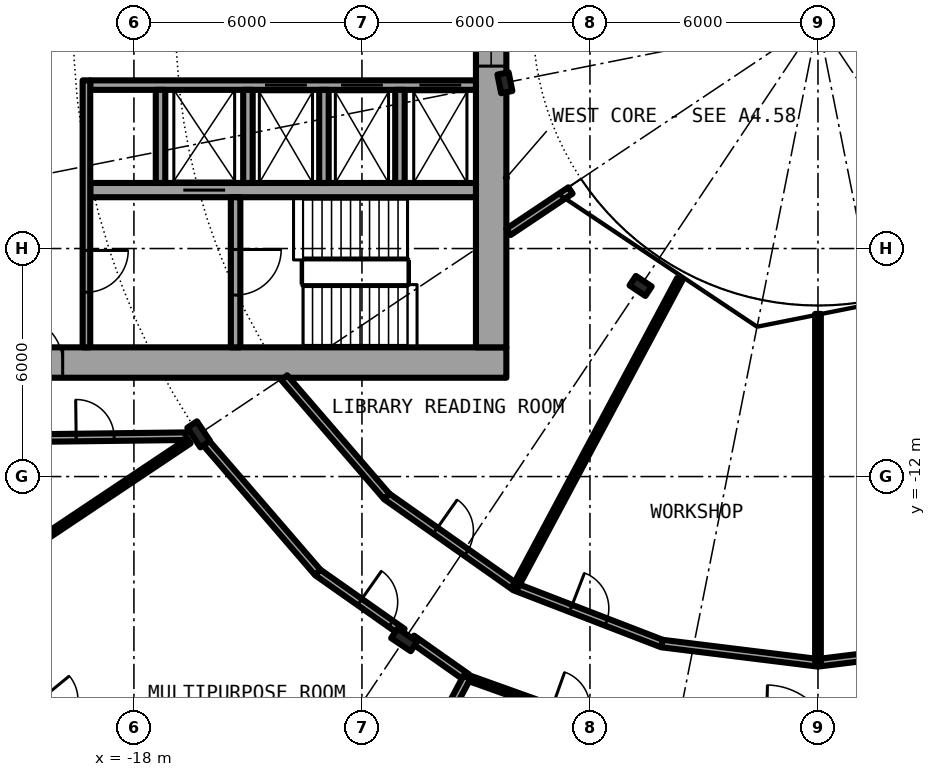
"""IFC4 building model, lengths in metres.
Left out: names, types, materials, properties, quantities, classifications, styles, units other than length and angle.
Written with IfcOpenShell. Run it as: python <this file> out.ifc"""

import sys

from ifc_helpers import new_model, si_unit, direction, frame, frame_2d, origin, origin_2d, place, context, subcontext, project, spatial, rectangle, i_section, extrude, element, fill, save


model = new_model("IFC4")
c1 = context("Model", 3, precision=1e-05, world=origin(), true_north=direction((0.0, 1.0)))
c2 = subcontext(c1, "Body", "Model", "MODEL_VIEW")
j1 = project(units=[si_unit("LENGTHUNIT", "METRE"), si_unit("PLANEANGLEUNIT", "RADIAN")], contexts=[c1])
p1 = place(None, origin())
s1 = spatial("IfcSite", under=j1, at=p1, CompositionType="ELEMENT")
p2 = place(p1, origin())
s2 = spatial("IfcBuilding", under=s1, at=p2, CompositionType="ELEMENT")
p3 = place(p2, frame((0.0, 0.0, 53.3)))
s3 = spatial("IfcBuildingStorey", under=s2, at=p3, CompositionType="ELEMENT", Elevation=53.3)
for number, where, z_axis, x_axis in (
    (1, (-16.297, -10.889, 0.0), (0.0, 0.0, 1.0), (-0.831, -0.556, 0.0)),
    (2, (-10.889, -16.297, 0.0), (0.0, 0.0, 1.0), (-0.556, -0.831, 0.0)),
):
    element("IfcColumn", number, at=place(p3, frame(where, z_axis=z_axis, x_axis=x_axis)), inside=s3, PredefinedType="COLUMN", context=c2, shape_type="SweptSolid", body=[
        extrude(i_section(OverallWidth=0.305, OverallDepth=0.62, WebThickness=0.021, FlangeThickness=0.04, FilletRadius=0.027, at=origin_2d()), origin(), (0.0, 0.0, 1.0), 4.2),
    ])
for number, where, z_axis, x_axis in (
    (3, (-8.239, -1.639, 0.0), (0.0, 0.0, 1.0), (-0.981, -0.195, 0.0)),
    (4, (-4.667, -6.984, 0.0), (0.0, 0.0, 1.0), (-0.556, -0.831, 0.0)),
):
    element("IfcColumn", number, at=place(p3, frame(where, z_axis=z_axis, x_axis=x_axis)), inside=s3, PredefinedType="COLUMN", context=c2, shape_type="SweptSolid", body=[
        extrude(i_section(OverallWidth=0.3, OverallDepth=0.5, WebThickness=0.014, FlangeThickness=0.028, FilletRadius=0.027, at=origin_2d()), origin(), (0.0, 0.0, 1.0), 4.2),
    ])
p4 = place(p3, frame((-22.699, -15.167, 0.0), z_axis=(0.0, 0.0, 1.0), x_axis=(0.634382322723, -0.773019449054, 0.0)))
e5 = element("IfcWall", 5, at=p4, inside=s3, PredefinedType="SOLIDWALL", context=c2, shape_type="SweptSolid", body=[
    extrude(rectangle(XDim=5.352, YDim=0.25, at=frame_2d((2.676, 0.0))), origin(), (0.0, 0.0, 1.0), 3.8),
])
p5 = place(p4, frame((0.841, 0.0, 0.0)))
e6 = element("IfcOpeningElement", 6, at=p5, cuts=e5, PredefinedType="OPENING", context=c2, shape_type="SweptSolid", body=[
    extrude(rectangle(XDim=1.0, YDim=2.2, at=frame_2d((0.5, 1.1))), frame((0.0, 0.135, 0.0), z_axis=(0.0, -1.0, 0.0), x_axis=(1.0, 0.0, 0.0)), (0.0, 0.0, 1.0), 0.27),
])
p6 = place(p4, frame((3.51, 0.0, 0.0)))
e7 = element("IfcOpeningElement", 7, at=p6, cuts=e5, PredefinedType="OPENING", context=c2, shape_type="SweptSolid", body=[
    extrude(rectangle(XDim=1.0, YDim=2.2, at=frame_2d((0.5, 1.1))), frame((0.0, 0.135, 0.0), z_axis=(0.0, -1.0, 0.0), x_axis=(1.0, 0.0, 0.0)), (0.0, 0.0, 1.0), 0.27),
])
p7 = place(p3, frame((-22.4, -9.0, 0.0), z_axis=(0.0, 0.0, 1.0), x_axis=(1.0, 0.0, 0.0)))
e8 = element("IfcWall", 8, at=p7, inside=s3, PredefinedType="SHEAR", context=c2, shape_type="SweptSolid", body=[
    extrude(rectangle(XDim=14.2, YDim=0.8, at=frame_2d((7.1, 0.0))), origin(), (0.0, 0.0, 1.0), 4.2),
])
p8 = place(p7, frame((1.325, 0.0, 0.0)))
e9 = element("IfcOpeningElement", 9, at=p8, cuts=e8, PredefinedType="OPENING", context=c2, shape_type="SweptSolid", body=[
    extrude(rectangle(XDim=1.2, YDim=2.3, at=frame_2d((0.6, 1.15))), frame((0.0, 0.41, 0.0), z_axis=(0.0, -1.0, 0.0), x_axis=(1.0, 0.0, 0.0)), (0.0, 0.0, 1.0), 0.82),
])
p9 = place(p3, frame((-8.6, 8.6, 0.0), z_axis=(0.0, 0.0, 1.0), x_axis=(0.0, -1.0, 0.0)))
e10 = element("IfcWall", 10, at=p9, inside=s3, PredefinedType="SHEAR", context=c2, shape_type="SweptSolid", body=[
    extrude(rectangle(XDim=17.2, YDim=0.8, at=frame_2d((8.6, 0.0))), origin(), (0.0, 0.0, 1.0), 4.2),
])
p10 = place(p9, frame((7.4, 0.0, 0.1)))
e11 = element("IfcOpeningElement", 11, at=p10, cuts=e10, PredefinedType="OPENING", context=c2, shape_type="SweptSolid", body=[
    extrude(rectangle(XDim=2.4, YDim=2.2, at=frame_2d((1.2, 1.1))), frame((0.0, 0.41, 0.0), z_axis=(0.0, -1.0, 0.0), x_axis=(1.0, 0.0, 0.0)), (0.0, 0.0, 1.0), 0.82),
])
p11 = place(p3, frame((-9.0, -1.7, 0.0), z_axis=(0.0, 0.0, 1.0), x_axis=(-1.0, 0.0, 0.0)))
e12 = element("IfcWall", 12, at=p11, inside=s3, PredefinedType="SHEAR", context=c2, shape_type="SweptSolid", body=[
    extrude(rectangle(XDim=10.15, YDim=0.25, at=frame_2d((5.075, 0.0))), origin(), (0.0, 0.0, 1.0), 4.2),
])
p12 = place(p11, frame((0.387, 0.0, 0.0)))
e13 = element("IfcOpeningElement", 13, at=p12, cuts=e12, PredefinedType="OPENING", context=c2, shape_type="SweptSolid", body=[
    extrude(rectangle(XDim=1.1, YDim=2.3, at=frame_2d((0.55, 1.15))), frame((0.0, 0.135, 0.0), z_axis=(0.0, -1.0, 0.0), x_axis=(1.0, 0.0, 0.0)), (0.0, 0.0, 1.0), 0.27),
])
p13 = place(p11, frame((2.45, 0.0, 0.0)))
e14 = element("IfcOpeningElement", 14, at=p13, cuts=e12, PredefinedType="OPENING", context=c2, shape_type="SweptSolid", body=[
    extrude(rectangle(XDim=1.1, YDim=2.3, at=frame_2d((0.55, 1.15))), frame((0.0, 0.135, 0.0), z_axis=(0.0, -1.0, 0.0), x_axis=(1.0, 0.0, 0.0)), (0.0, 0.0, 1.0), 0.27),
])
p14 = place(p11, frame((4.45, 0.0, 0.0)))
e15 = element("IfcOpeningElement", 15, at=p14, cuts=e12, PredefinedType="OPENING", context=c2, shape_type="SweptSolid", body=[
    extrude(rectangle(XDim=1.1, YDim=2.3, at=frame_2d((0.55, 1.15))), frame((0.0, 0.135, 0.0), z_axis=(0.0, -1.0, 0.0), x_axis=(1.0, 0.0, 0.0)), (0.0, 0.0, 1.0), 0.27),
])
p15 = place(p3, frame((-9.0, -4.462, 0.0), z_axis=(0.0, 0.0, 1.0), x_axis=(-1.0, 0.0, 0.0)))
e16 = element("IfcWall", 16, at=p15, inside=s3, PredefinedType="SHEAR", context=c2, shape_type="SweptSolid", body=[
    extrude(rectangle(XDim=10.15, YDim=0.375, at=frame_2d((5.075, 0.0))), origin(), (0.0, 0.0, 1.0), 4.2),
])
p16 = place(p15, frame((6.6, 0.0, 0.0)))
e17 = element("IfcOpeningElement", 17, at=p16, cuts=e16, PredefinedType="OPENING", context=c2, shape_type="SweptSolid", body=[
    extrude(rectangle(XDim=1.1, YDim=2.3, at=frame_2d((0.55, 1.15))), frame((0.0, 0.198, 0.0), z_axis=(0.0, -1.0, 0.0), x_axis=(1.0, 0.0, 0.0)), (0.0, 0.0, 1.0), 0.395),
])
p17 = place(p3, frame((-15.325, -4.65, 0.0), z_axis=(0.0, 0.0, 1.0), x_axis=(0.0, -1.0, 0.0)))
e18 = element("IfcWall", 18, at=p17, inside=s3, PredefinedType="SHEAR", context=c2, shape_type="SweptSolid", body=[
    extrude(rectangle(XDim=3.95, YDim=0.25, at=frame_2d((1.975, 0.0))), origin(), (0.0, 0.0, 1.0), 4.2),
])
p18 = place(p17, frame((1.375, 0.0, 0.0)))
e19 = element("IfcOpeningElement", 19, at=p18, cuts=e18, PredefinedType="OPENING", context=c2, shape_type="SweptSolid", body=[
    extrude(rectangle(XDim=1.2, YDim=2.3, at=frame_2d((0.6, 1.15))), frame((0.0, 0.135, 0.0), z_axis=(0.0, -1.0, 0.0), x_axis=(1.0, 0.0, 0.0)), (0.0, 0.0, 1.0), 0.27),
])
for number, where, z_axis, x_axis in (
    (20, (-15.0, -1.825, 0.0), (0.0, 0.0, 1.0), (0.0, -1.0, 0.0)),
    (21, (-17.3, -1.825, 0.0), (0.0, 0.0, 1.0), (0.0, -1.0, 0.0)),
):
    element("IfcWall", number, at=place(p3, frame(where, z_axis=z_axis, x_axis=x_axis)), inside=s3, PredefinedType="SOLIDWALL", context=c2, shape_type="SweptSolid", body=[
        extrude(rectangle(XDim=2.45, YDim=0.25, at=frame_2d((1.225, 0.0))), origin(), (0.0, 0.0, 1.0), 3.8),
    ])
p19 = place(p3, frame((-19.25, -1.575, 0.0), z_axis=(0.0, 0.0, 1.0), x_axis=(0.0, -1.0, 0.0)))
e22 = element("IfcWall", 22, at=p19, inside=s3, PredefinedType="SOLIDWALL", context=c2, shape_type="SweptSolid", body=[
    extrude(rectangle(XDim=7.025, YDim=0.2, at=frame_2d((3.513, 0.0))), origin(), (0.0, 0.0, 1.0), 3.8),
])
p20 = place(p19, frame((4.475, 0.0, 0.0)))
e23 = element("IfcOpeningElement", 23, at=p20, cuts=e22, PredefinedType="OPENING", context=c2, shape_type="SweptSolid", body=[
    extrude(rectangle(XDim=1.1, YDim=2.3, at=frame_2d((0.55, 1.15))), frame((0.0, 0.11, 0.0), z_axis=(0.0, -1.0, 0.0), x_axis=(1.0, 0.0, 0.0)), (0.0, 0.0, 1.0), 0.22),
])
for number, where, z_axis, x_axis in (
    (24, (-11.0, -1.825, 0.0), (0.0, 0.0, 1.0), (0.0, -1.0, 0.0)),
    (25, (-13.0, -1.825, 0.0), (0.0, 0.0, 1.0), (0.0, -1.0, 0.0)),
):
    element("IfcWall", number, at=place(p3, frame(where, z_axis=z_axis, x_axis=x_axis)), inside=s3, PredefinedType="SOLIDWALL", context=c2, shape_type="SweptSolid", body=[
        extrude(rectangle(XDim=2.45, YDim=0.25, at=frame_2d((1.225, 0.0))), origin(), (0.0, 0.0, 1.0), 3.8),
    ])
p21 = place(p3, frame((-16.196, -11.006, 0.0), z_axis=(0.0, 0.0, 1.0), x_axis=(0.653087281304, -0.757282644063, 0.0)))
e26 = element("IfcWall", 26, at=p21, inside=s3, PredefinedType="PARTITIONING", context=c2, shape_type="SweptSolid", body=[
    extrude(rectangle(XDim=4.644, YDim=0.2, at=frame_2d((2.322, 0.0))), origin(), (0.0, 0.0, 1.0), 3.48),
])
p22 = place(p3, frame((-13.163, -14.523, 0.0), z_axis=(0.0, 0.0, 1.0), x_axis=(0.817764243714, -0.575553335237, 0.0)))
e27 = element("IfcWall", 27, at=p22, inside=s3, PredefinedType="PARTITIONING", context=c2, shape_type="SweptSolid", body=[
    extrude(rectangle(XDim=2.725, YDim=0.2, at=frame_2d((1.362, 0.0))), origin(), (0.0, 0.0, 1.0), 3.48),
])
p23 = place(p22, frame((1.35, 0.0, 0.0)))
e28 = element("IfcOpeningElement", 28, at=p23, cuts=e27, PredefinedType="OPENING", context=c2, shape_type="SweptSolid", body=[
    extrude(rectangle(XDim=1.0, YDim=2.3, at=frame_2d((0.5, 1.15))), frame((0.0, 0.11, 0.0), z_axis=(0.0, -1.0, 0.0), x_axis=(1.0, 0.0, 0.0)), (0.0, 0.0, 1.0), 0.22),
])
p24 = place(p3, frame((-10.686, -16.267, 0.0), z_axis=(0.0, 0.0, 1.0), x_axis=(0.81766692021, -0.575691590693, 0.0)))
e29 = element("IfcWall", 29, at=p24, inside=s3, PredefinedType="PARTITIONING", context=c2, shape_type="SweptSolid", body=[
    extrude(rectangle(XDim=1.77, YDim=0.2, at=frame_2d((0.885, 0.0))), origin(), (0.0, 0.0, 1.0), 3.48),
])
p25 = place(p3, frame((-9.239, -17.286, 0.0), z_axis=(0.0, 0.0, 1.0), x_axis=(0.94157995483, -0.336789531699, 0.0)))
e30 = element("IfcWall", 30, at=p25, inside=s3, PredefinedType="PARTITIONING", context=c2, shape_type="SweptSolid", body=[
    extrude(rectangle(XDim=5.597, YDim=0.15, at=frame_2d((2.798, 0.0))), origin(), (0.0, 0.0, 1.0), 3.48),
])
p26 = place(p25, frame((2.376, 0.0, 0.0)))
e31 = element("IfcOpeningElement", 31, at=p26, cuts=e30, PredefinedType="OPENING", context=c2, shape_type="SweptSolid", body=[
    extrude(rectangle(XDim=1.0, YDim=2.3, at=frame_2d((0.5, 1.15))), frame((0.0, 0.085, 0.0), z_axis=(0.0, -1.0, 0.0), x_axis=(1.0, 0.0, 0.0)), (0.0, 0.0, 1.0), 0.17),
])
p27 = place(p3, frame((-14.043, -9.4, 0.0), z_axis=(0.0, 0.0, 1.0), x_axis=(0.653274518104, -0.757121129012, 0.0)))
e32 = element("IfcWall", 32, at=p27, inside=s3, PredefinedType="PARTITIONING", context=c2, shape_type="SweptSolid", body=[
    extrude(rectangle(XDim=4.124, YDim=0.2, at=frame_2d((2.062, 0.0))), origin(), (0.0, 0.0, 1.0), 3.8),
])
p28 = place(p3, frame((-11.349, -12.522, 0.0), z_axis=(0.0, 0.0, 1.0), x_axis=(0.817567680547, -0.575832517079, 0.0)))
e33 = element("IfcWall", 33, at=p28, inside=s3, PredefinedType="PARTITIONING", context=c2, shape_type="SweptSolid", body=[
    extrude(rectangle(XDim=4.137, YDim=0.2, at=frame_2d((2.068, 0.0))), origin(), (0.0, 0.0, 1.0), 3.8),
])
p29 = place(p28, frame((1.568, 0.0, 0.0)))
e34 = element("IfcOpeningElement", 34, at=p29, cuts=e33, PredefinedType="OPENING", context=c2, shape_type="SweptSolid", body=[
    extrude(rectangle(XDim=1.0, YDim=2.3, at=frame_2d((0.5, 1.15))), frame((0.0, 0.11, 0.0), z_axis=(0.0, -1.0, 0.0), x_axis=(1.0, 0.0, 0.0)), (0.0, 0.0, 1.0), 0.22),
])
p30 = place(p3, frame((-7.967, -14.904, 0.0), z_axis=(0.0, 0.0, 1.0), x_axis=(0.932943640288, -0.360022449363, 0.0)))
e35 = element("IfcWall", 35, at=p30, inside=s3, PredefinedType="PARTITIONING", context=c2, shape_type="SweptSolid", body=[
    extrude(rectangle(XDim=4.139, YDim=0.2, at=frame_2d((2.069, 0.0))), origin(), (0.0, 0.0, 1.0), 3.8),
])
p31 = place(p30, frame((1.569, 0.0, 0.0)))
e36 = element("IfcOpeningElement", 36, at=p31, cuts=e35, PredefinedType="OPENING", context=c2, shape_type="SweptSolid", body=[
    extrude(rectangle(XDim=1.0, YDim=2.3, at=frame_2d((0.5, 1.15))), frame((0.0, 0.11, 0.0), z_axis=(0.0, -1.0, 0.0), x_axis=(1.0, 0.0, 0.0)), (0.0, 0.0, 1.0), 0.22),
])
for number, where, z_axis, x_axis in (
    (37, (-4.106, -16.394, 0.0), (0.0, 0.0, 1.0), (0.992, -0.122, 0.0)),
    (38, (0.0, -16.9, 0.0), (0.0, 0.0, 1.0), (0.992, 0.122, 0.0)),
):
    element("IfcWall", number, at=place(p3, frame(where, z_axis=z_axis, x_axis=x_axis)), inside=s3, PredefinedType="PARTITIONING", context=c2, shape_type="SweptSolid", body=[
        extrude(rectangle(XDim=4.137, YDim=0.2, at=frame_2d((2.068, 0.0))), origin(), (0.0, 0.0, 1.0), 3.8),
    ])
p32 = place(p3, frame((-21.675, -11.0, 0.0), z_axis=(0.0, 0.0, 1.0), x_axis=(0.99992425795, 0.012307654658, 0.0)))
e39 = element("IfcWall", 39, at=p32, inside=s3, PredefinedType="PARTITIONING", context=c2, shape_type="SweptSolid", body=[
    extrude(rectangle(XDim=5.039, YDim=0.2, at=frame_2d((2.519, 0.0))), origin(), (0.0, 0.0, 1.0), 3.8),
])
p33 = place(p32, frame((2.155, 0.0, 0.0)))
e40 = element("IfcOpeningElement", 40, at=p33, cuts=e39, PredefinedType="OPENING", context=c2, shape_type="SweptSolid", body=[
    extrude(rectangle(XDim=1.0, YDim=2.3, at=frame_2d((0.5, 1.15))), frame((0.0, 0.11, 0.0), z_axis=(0.0, -1.0, 0.0), x_axis=(1.0, 0.0, 0.0)), (0.0, 0.0, 1.0), 0.22),
])
p34 = place(p3, frame((-6.513, -4.472, 0.0), z_axis=(0.0, 0.0, 1.0), x_axis=(-0.831417956244, -0.555647533996, 0.0)))
e41 = element("IfcWall", 41, at=p34, inside=s3, PredefinedType="PARTITIONING", context=c2, shape_type="SweptSolid", body=[
    extrude(rectangle(XDim=1.962, YDim=0.2, at=frame_2d((0.981, 0.0))), origin(), (0.0, 0.0, 1.0), 3.8),
])
p35 = place(p3, frame((-22.593, -15.101, 0.0), z_axis=(0.0, 0.0, 1.0), x_axis=(0.831491533374, 0.555537424416, 0.0)))
e42 = element("IfcWall", 42, at=p35, inside=s3, PredefinedType="PARTITIONING", context=c2, shape_type="SweptSolid", body=[
    extrude(rectangle(XDim=7.265, YDim=0.15, at=frame_2d((3.633, 0.0))), origin(), (0.0, 0.0, 1.0), 3.8),
])
p36 = place(p3, frame((-10.37, -19.402, 0.0), z_axis=(0.0, 0.0, 1.0), x_axis=(0.471385457832, 0.881927293004, 0.0)))
e43 = element("IfcWall", 43, at=p36, inside=s3, PredefinedType="PARTITIONING", context=c2, shape_type="SweptSolid", body=[
    extrude(rectangle(XDim=2.399, YDim=0.2, at=frame_2d((1.2, 0.0))), origin(), (0.0, 0.0, 1.0), 3.8),
])
p37 = place(p3, frame((-7.966, -14.905, 0.0), z_axis=(0.0, 0.0, 1.0), x_axis=(0.471460365694, 0.881887251059, 0.0)))
e44 = element("IfcWall", 44, at=p37, inside=s3, PredefinedType="PARTITIONING", context=c2, shape_type="SweptSolid", body=[
    extrude(rectangle(XDim=9.18, YDim=0.15, at=frame_2d((4.59, 0.0))), origin(), (0.0, 0.0, 1.0), 3.8),
])
p38 = place(p3, frame((0.0, -16.9, 0.0), z_axis=(0.0, 0.0, 1.0), x_axis=(0.0, 1.0, 0.0)))
e45 = element("IfcWall", 45, at=p38, inside=s3, PredefinedType="PARTITIONING", context=c2, shape_type="SweptSolid", body=[
    extrude(rectangle(XDim=9.18, YDim=0.15, at=frame_2d((4.59, 0.0))), origin(), (0.0, 0.0, 1.0), 3.8),
])
p39 = place(p12, origin())
e46 = element("IfcDoor", 46, at=p39, inside=s3, OperationType="DOUBLE_DOOR_SLIDING", PredefinedType="DOOR", context=c2, shape_type="SweptSolid", body=[
    extrude(rectangle(XDim=1.1, YDim=2.3, at=frame_2d((0.55, 1.15))), frame((0.0, 0.025, 0.0), z_axis=(0.0, -1.0, 0.0), x_axis=(1.0, 0.0, 0.0)), (0.0, 0.0, 1.0), 0.05),
])
fill(e13, e46)
p40 = place(p13, origin())
e47 = element("IfcDoor", 47, at=p40, inside=s3, OperationType="DOUBLE_DOOR_SLIDING", PredefinedType="DOOR", context=c2, shape_type="SweptSolid", body=[
    extrude(rectangle(XDim=1.1, YDim=2.3, at=frame_2d((0.55, 1.15))), frame((0.0, 0.025, 0.0), z_axis=(0.0, -1.0, 0.0), x_axis=(1.0, 0.0, 0.0)), (0.0, 0.0, 1.0), 0.05),
])
fill(e14, e47)
p41 = place(p14, origin())
e48 = element("IfcDoor", 48, at=p41, inside=s3, OperationType="DOUBLE_DOOR_SLIDING", PredefinedType="DOOR", context=c2, shape_type="SweptSolid", body=[
    extrude(rectangle(XDim=1.1, YDim=2.3, at=frame_2d((0.55, 1.15))), frame((0.0, 0.025, 0.0), z_axis=(0.0, -1.0, 0.0), x_axis=(1.0, 0.0, 0.0)), (0.0, 0.0, 1.0), 0.05),
])
fill(e15, e48)
p42 = place(p16, origin())
e49 = element("IfcDoor", 49, at=p42, inside=s3, OperationType="DOUBLE_DOOR_SLIDING", PredefinedType="DOOR", context=c2, shape_type="SweptSolid", body=[
    extrude(rectangle(XDim=1.1, YDim=2.3, at=frame_2d((0.55, 1.15))), frame((0.0, 0.025, 0.0), z_axis=(0.0, -1.0, 0.0), x_axis=(1.0, 0.0, 0.0)), (0.0, 0.0, 1.0), 0.05),
])
fill(e17, e49)
p43 = place(p18, origin())
e50 = element("IfcDoor", 50, at=p43, inside=s3, OperationType="SINGLE_SWING_LEFT", PredefinedType="DOOR", context=c2, shape_type="SweptSolid", body=[
    extrude(rectangle(XDim=1.2, YDim=2.3, at=frame_2d((0.6, 1.15))), frame((0.0, 0.025, 0.0), z_axis=(0.0, -1.0, 0.0), x_axis=(1.0, 0.0, 0.0)), (0.0, 0.0, 1.0), 0.05),
])
fill(e19, e50)
p44 = place(p20, origin())
e51 = element("IfcDoor", 51, at=p44, inside=s3, OperationType="SINGLE_SWING_LEFT", PredefinedType="DOOR", context=c2, shape_type="SweptSolid", body=[
    extrude(rectangle(XDim=1.1, YDim=2.3, at=frame_2d((0.55, 1.15))), frame((0.0, 0.025, 0.0), z_axis=(0.0, -1.0, 0.0), x_axis=(1.0, 0.0, 0.0)), (0.0, 0.0, 1.0), 0.05),
])
fill(e23, e51)
p45 = place(p8, origin())
e52 = element("IfcDoor", 52, at=p45, inside=s3, OperationType="SINGLE_SWING_RIGHT", PredefinedType="DOOR", context=c2, shape_type="SweptSolid", body=[
    extrude(rectangle(XDim=1.2, YDim=2.3, at=frame_2d((0.6, 1.15))), frame((0.0, 0.025, 0.0), z_axis=(0.0, -1.0, 0.0), x_axis=(1.0, 0.0, 0.0)), (0.0, 0.0, 1.0), 0.05),
])
fill(e9, e52)
p46 = place(p10, origin())
e53 = element("IfcWindow", 53, at=p46, inside=s3, PartitioningType="SINGLE_PANEL", PredefinedType="WINDOW", context=c2, shape_type="SweptSolid", body=[
    extrude(rectangle(XDim=2.4, YDim=2.2, at=frame_2d((1.2, 1.1))), frame((0.0, 0.03, 0.0), z_axis=(0.0, -1.0, 0.0), x_axis=(1.0, 0.0, 0.0)), (0.0, 0.0, 1.0), 0.06),
])
fill(e11, e53)
p47 = place(p23, origin())
e54 = element("IfcDoor", 54, at=p47, inside=s3, OperationType="SINGLE_SWING_RIGHT", PredefinedType="DOOR", context=c2, shape_type="SweptSolid", body=[
    extrude(rectangle(XDim=1.0, YDim=2.3, at=frame_2d((0.5, 1.15))), frame((0.0, 0.025, 0.0), z_axis=(0.0, -1.0, 0.0), x_axis=(1.0, 0.0, 0.0)), (0.0, 0.0, 1.0), 0.05),
])
fill(e28, e54)
p48 = place(p29, origin())
e55 = element("IfcDoor", 55, at=p48, inside=s3, OperationType="SINGLE_SWING_RIGHT", PredefinedType="DOOR", context=c2, shape_type="SweptSolid", body=[
    extrude(rectangle(XDim=1.0, YDim=2.3, at=frame_2d((0.5, 1.15))), frame((0.0, 0.025, 0.0), z_axis=(0.0, -1.0, 0.0), x_axis=(1.0, 0.0, 0.0)), (0.0, 0.0, 1.0), 0.05),
])
fill(e34, e55)
p49 = place(p31, origin())
e56 = element("IfcDoor", 56, at=p49, inside=s3, OperationType="SINGLE_SWING_LEFT", PredefinedType="DOOR", context=c2, shape_type="SweptSolid", body=[
    extrude(rectangle(XDim=1.0, YDim=2.3, at=frame_2d((0.5, 1.15))), frame((0.0, 0.025, 0.0), z_axis=(0.0, -1.0, 0.0), x_axis=(1.0, 0.0, 0.0)), (0.0, 0.0, 1.0), 0.05),
])
fill(e36, e56)
p50 = place(p33, origin())
e57 = element("IfcDoor", 57, at=p50, inside=s3, OperationType="SINGLE_SWING_RIGHT", PredefinedType="DOOR", context=c2, shape_type="SweptSolid", body=[
    extrude(rectangle(XDim=1.0, YDim=2.3, at=frame_2d((0.5, 1.15))), frame((0.0, 0.025, 0.0), z_axis=(0.0, -1.0, 0.0), x_axis=(1.0, 0.0, 0.0)), (0.0, 0.0, 1.0), 0.05),
])
fill(e40, e57)
save(model, sys.argv[1])
